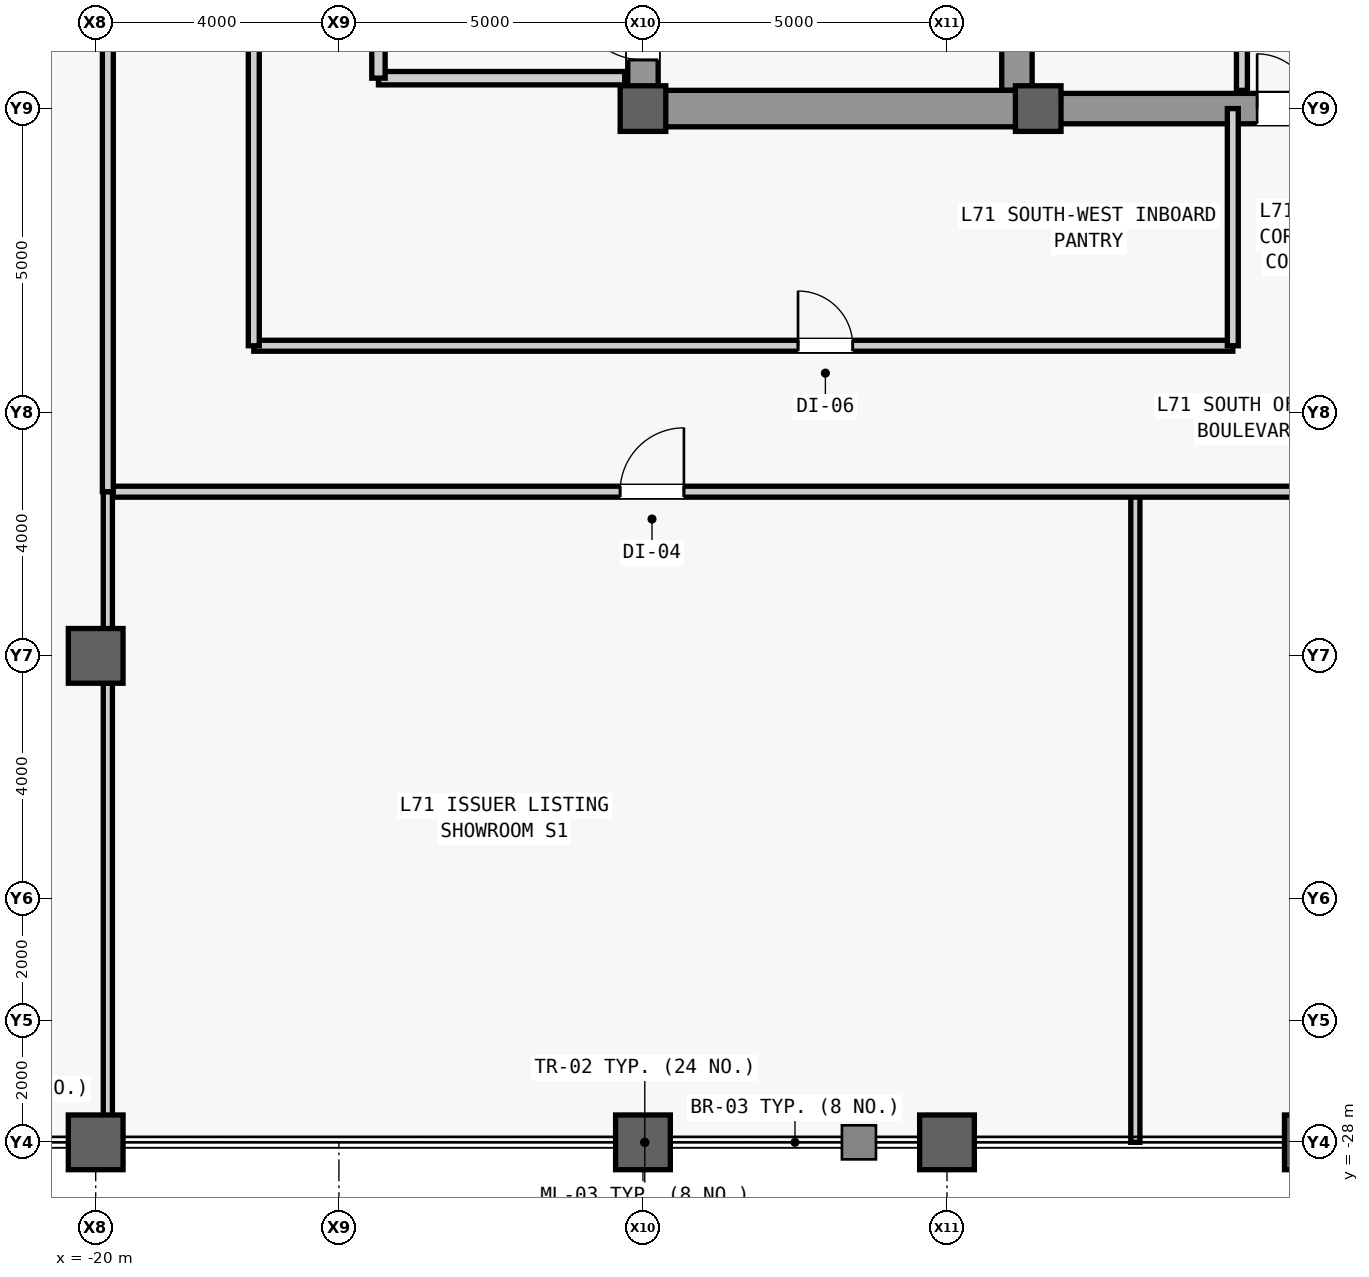
"""IFC4 building model, lengths in metres.
Left out: names, types, materials, properties, quantities, classifications, styles, units other than length and angle.
Written with IfcOpenShell. Run it as: python <this file> out.ifc"""

import sys

from ifc_helpers import new_model, si_unit, direction, frame, frame_2d, origin, origin_2d, place, context, subcontext, project, spatial, rectangle, hollow_rectangle, extrude, source, transform, mapped, element, fill, save


model = new_model("IFC4")
c1 = context("Model", 3, precision=1e-05, world=origin(), true_north=direction((0.0, 1.0)))
c2 = subcontext(c1, "Body", "Model", "MODEL_VIEW")
j1 = project(units=[si_unit("LENGTHUNIT", "METRE"), si_unit("PLANEANGLEUNIT", "RADIAN")], contexts=[c1])
p1 = place(None, origin())
s1 = spatial("IfcSite", under=j1, at=p1, CompositionType="ELEMENT")
p2 = place(p1, origin())
s2 = spatial("IfcBuilding", under=s1, at=p2, CompositionType="ELEMENT")
p3 = place(p2, frame((0.0, 0.0, 301.5)))
s3 = spatial("IfcBuildingStorey", under=s2, at=p3, CompositionType="ELEMENT", Elevation=301.5)
m1 = source(origin(), c2, "Body", "SweptSolid", [
    extrude(rectangle(XDim=22.0, YDim=0.5, at=frame_2d((11.0, 0.0))), origin(), (0.0, 0.0, 1.0), 3.78),
])
p4 = place(p3, frame((-11.0, -11.0, 0.0), z_axis=(0.0, 0.0, 1.0), x_axis=(0.0, 1.0, 0.0)))
e1 = element("IfcWall", 1, at=p4, inside=s3, PredefinedType="SHEAR", context=c2, shape_type="MappedRepresentation", body=[
    mapped(m1, transform((0.0, 0.0, 0.0), scale=1.0)),
])
m2 = source(origin(), c2, "Body", "SweptSolid", [
    extrude(rectangle(XDim=1.1, YDim=2.2, at=frame_2d((0.55, 1.1))), frame((0.0, 0.26, 0.0), z_axis=(0.0, -1.0, 0.0), x_axis=(1.0, 0.0, 0.0)), (0.0, 0.0, 1.0), 0.52),
])
p5 = place(p4, frame((0.8, 0.0, 0.0)))
e2 = element("IfcOpeningElement", 2, at=p5, cuts=e1, PredefinedType="OPENING", context=c2, shape_type="MappedRepresentation", body=[
    mapped(m2, transform((0.0, 0.0, 0.0), scale=1.0)),
])
p6 = place(p4, frame((12.5, 0.0, 0.0)))
e3 = element("IfcOpeningElement", 3, at=p6, cuts=e1, PredefinedType="OPENING", context=c2, shape_type="MappedRepresentation", body=[
    mapped(m2, transform((0.0, 0.0, 0.0), scale=1.0)),
])
m3 = source(origin(), c2, "Body", "SweptSolid", [
    extrude(rectangle(XDim=0.9, YDim=2.15, at=frame_2d((0.45, 1.075))), frame((0.0, 0.26, 0.0), z_axis=(0.0, -1.0, 0.0), x_axis=(1.0, 0.0, 0.0)), (0.0, 0.0, 1.0), 0.52),
])
p7 = place(p4, frame((6.85, 0.0, 0.0)))
e4 = element("IfcOpeningElement", 4, at=p7, cuts=e1, PredefinedType="OPENING", context=c2, shape_type="MappedRepresentation", body=[
    mapped(m3, transform((0.0, 0.0, 0.0), scale=1.0)),
])
m4 = source(origin(), c2, "Body", "SweptSolid", [
    extrude(rectangle(XDim=1.2, YDim=2.3, at=frame_2d((0.6, 1.15))), frame((0.0, 0.26, 0.0), z_axis=(0.0, -1.0, 0.0), x_axis=(1.0, 0.0, 0.0)), (0.0, 0.0, 1.0), 0.52),
])
p8 = place(p4, frame((14.6, 0.0, 0.0)))
e5 = element("IfcOpeningElement", 5, at=p8, cuts=e1, PredefinedType="OPENING", context=c2, shape_type="MappedRepresentation", body=[
    mapped(m4, transform((0.0, 0.0, 0.0), scale=1.0)),
])
p9 = place(p4, frame((18.2, 0.0, 0.0)))
e6 = element("IfcOpeningElement", 6, at=p9, cuts=e1, PredefinedType="OPENING", context=c2, shape_type="MappedRepresentation", body=[
    mapped(m4, transform((0.0, 0.0, 0.0), scale=1.0)),
])
m5 = source(origin(), c2, "Body", "SweptSolid", [
    extrude(rectangle(XDim=1.3, YDim=2.3, at=frame_2d((0.65, 1.15))), frame((0.0, 0.26, 0.0), z_axis=(0.0, -1.0, 0.0), x_axis=(1.0, 0.0, 0.0)), (0.0, 0.0, 1.0), 0.52),
])
p10 = place(p4, frame((2.7, 0.0, 0.0)))
e7 = element("IfcOpeningElement", 7, at=p10, cuts=e1, PredefinedType="OPENING", context=c2, shape_type="MappedRepresentation", body=[
    mapped(m5, transform((0.0, 0.0, 0.0), scale=1.0)),
])
m6 = source(origin(), c2, "Body", "SweptSolid", [
    extrude(rectangle(XDim=21.4, YDim=0.5, at=frame_2d((10.7, 0.0))), origin(), (0.0, 0.0, 1.0), 3.78),
])
p11 = place(p3, frame((-4.85, -10.7, 0.0), z_axis=(0.0, 0.0, 1.0), x_axis=(0.0, 1.0, 0.0)))
e8 = element("IfcWall", 8, at=p11, inside=s3, PredefinedType="SHEAR", context=c2, shape_type="MappedRepresentation", body=[
    mapped(m6, transform((0.0, 0.0, 0.0), scale=1.0)),
])
m7 = source(origin(), c2, "Body", "SweptSolid", [
    extrude(rectangle(XDim=5.9, YDim=0.6, at=frame_2d((2.95, 0.0))), origin(), (0.0, 0.0, 1.0), 3.78),
])
p12 = place(p3, frame((-10.75, -11.0, 0.0), z_axis=(0.0, 0.0, 1.0), x_axis=(1.0, 0.0, 0.0)))
e9 = element("IfcWall", 9, at=p12, inside=s3, PredefinedType="SHEAR", context=c2, shape_type="MappedRepresentation", body=[
    mapped(m7, transform((0.0, 0.0, 0.0), scale=1.0)),
])
m8 = source(origin(), c2, "Body", "SweptSolid", [
    extrude(rectangle(XDim=9.2, YDim=0.5, at=frame_2d((4.6, 0.0))), origin(), (0.0, 0.0, 1.0), 3.78),
])
p13 = place(p3, frame((-4.6, -11.0, 0.0), z_axis=(0.0, 0.0, 1.0), x_axis=(1.0, 0.0, 0.0)))
e10 = element("IfcWall", 10, at=p13, inside=s3, PredefinedType="SHEAR", context=c2, shape_type="MappedRepresentation", body=[
    mapped(m8, transform((0.0, 0.0, 0.0), scale=1.0)),
])
m9 = source(origin(), c2, "Body", "SweptSolid", [
    extrude(rectangle(XDim=1.8, YDim=2.25, at=frame_2d((0.9, 1.125))), frame((0.0, 0.26, 0.0), z_axis=(0.0, -1.0, 0.0), x_axis=(1.0, 0.0, 0.0)), (0.0, 0.0, 1.0), 0.52),
])
p14 = place(p13, frame((3.7, 0.0, 0.0)))
e11 = element("IfcOpeningElement", 11, at=p14, cuts=e10, PredefinedType="OPENING", context=c2, shape_type="MappedRepresentation", body=[
    mapped(m9, transform((0.0, 0.0, 0.0), scale=1.0)),
])
m10 = source(origin(), c2, "Body", "SweptSolid", [
    extrude(hollow_rectangle(XDim=0.9, YDim=0.9, WallThickness=0.05, at=origin_2d()), origin(), (0.0, 0.0, 1.0), 4.0),
])
for number, where, z_axis, x_axis in (
    (12, (-20.0, -28.0, 0.0), (0.0, 0.0, 1.0), (1.0, 0.0, 0.0)),
    (13, (-20.0, -20.0, 0.0), (0.0, 0.0, 1.0), (1.0, 0.0, 0.0)),
    (14, (-11.0, -28.0, 0.0), (0.0, 0.0, 1.0), (1.0, 0.0, 0.0)),
):
    element("IfcColumn", number, at=place(p3, frame(where, z_axis=z_axis, x_axis=x_axis)), inside=s3, PredefinedType="COLUMN", context=c2, shape_type="MappedRepresentation", body=[
        mapped(m10, transform((0.0, 0.0, 0.0), scale=1.0)),
    ])
m11 = source(origin(), c2, "Body", "SweptSolid", [
    extrude(rectangle(XDim=0.75, YDim=0.75, at=origin_2d()), origin(), (0.0, 0.0, 1.0), 4.0),
])
p15 = place(p3, frame((-11.0, -11.0, 0.0), z_axis=(0.0, 0.0, 1.0), x_axis=(1.0, 0.0, 0.0)))
e15 = element("IfcColumn", 15, at=p15, inside=s3, PredefinedType="COLUMN", context=c2, shape_type="MappedRepresentation", body=[
    mapped(m11, transform((0.0, 0.0, 0.0), scale=1.0)),
])
p16 = place(p3, frame((-6.0, -28.0, 0.0), z_axis=(0.0, 0.0, 1.0), x_axis=(1.0, 0.0, 0.0)))
e16 = element("IfcColumn", 16, at=p16, inside=s3, PredefinedType="COLUMN", context=c2, shape_type="MappedRepresentation", body=[
    mapped(m10, transform((0.0, 0.0, 0.0), scale=1.0)),
])
p17 = place(p3, frame((-4.5, -11.0, 0.0), z_axis=(0.0, 0.0, 1.0), x_axis=(1.0, 0.0, 0.0)))
e17 = element("IfcColumn", 17, at=p17, inside=s3, PredefinedType="COLUMN", context=c2, shape_type="MappedRepresentation", body=[
    mapped(m11, transform((0.0, 0.0, 0.0), scale=1.0)),
])
p18 = place(p3, frame((0.0, -28.0, 0.0), z_axis=(0.0, 0.0, 1.0), x_axis=(1.0, 0.0, 0.0)))
e18 = element("IfcColumn", 18, at=p18, inside=s3, PredefinedType="COLUMN", context=c2, shape_type="MappedRepresentation", body=[
    mapped(m10, transform((0.0, 0.0, 0.0), scale=1.0)),
])
m12 = source(origin(), c2, "Body", "SweptSolid", [
    extrude(rectangle(XDim=4.05, YDim=0.22, at=frame_2d((2.025, 0.0))), origin(), (0.0, 0.0, 1.0), 3.78),
])
p19 = place(p3, frame((-15.35, -10.5, 0.0), z_axis=(0.0, 0.0, 1.0), x_axis=(1.0, 0.0, 0.0)))
e19 = element("IfcWall", 19, at=p19, inside=s3, PredefinedType="PARTITIONING", context=c2, shape_type="MappedRepresentation", body=[
    mapped(m12, transform((0.0, 0.0, 0.0), scale=1.0)),
])
m13 = source(origin(), c2, "Body", "SweptSolid", [
    extrude(rectangle(XDim=4.4, YDim=0.22, at=frame_2d((2.2, 0.0))), origin(), (0.0, 0.0, 1.0), 3.78),
])
p20 = place(p3, frame((-15.35, -10.5, 0.0), z_axis=(0.0, 0.0, 1.0), x_axis=(0.0, 1.0, 0.0)))
e20 = element("IfcWall", 20, at=p20, inside=s3, PredefinedType="PARTITIONING", context=c2, shape_type="MappedRepresentation", body=[
    mapped(m13, transform((0.0, 0.0, 0.0), scale=1.0)),
])
m14 = source(origin(), c2, "Body", "SweptSolid", [
    extrude(rectangle(XDim=1.2, YDim=2.2, at=frame_2d((0.6, 1.1))), frame((0.0, 0.12, 0.0), z_axis=(0.0, -1.0, 0.0), x_axis=(1.0, 0.0, 0.0)), (0.0, 0.0, 1.0), 0.24),
])
p21 = place(p20, frame((1.6, 0.0, 0.0)))
e21 = element("IfcOpeningElement", 21, at=p21, cuts=e20, PredefinedType="OPENING", context=c2, shape_type="MappedRepresentation", body=[
    mapped(m14, transform((0.0, 0.0, 0.0), scale=1.0)),
])
m15 = source(origin(), c2, "Body", "SweptSolid", [
    extrude(rectangle(XDim=5.4, YDim=0.18, at=frame_2d((2.7, 0.0))), origin(), (0.0, 0.0, 1.0), 3.78),
])
p22 = place(p3, frame((-1.15, -10.7, 0.0), z_axis=(0.0, 0.0, 1.0), x_axis=(0.0, 1.0, 0.0)))
e22 = element("IfcWall", 22, at=p22, inside=s3, PredefinedType="PARTITIONING", context=c2, shape_type="MappedRepresentation", body=[
    mapped(m15, transform((0.0, 0.0, 0.0), scale=1.0)),
])
m16 = source(origin(), c2, "Body", "SweptSolid", [
    extrude(rectangle(XDim=0.9, YDim=2.15, at=frame_2d((0.45, 1.075))), frame((0.0, 0.1, 0.0), z_axis=(0.0, -1.0, 0.0), x_axis=(1.0, 0.0, 0.0)), (0.0, 0.0, 1.0), 0.2),
])
p23 = place(p22, frame((0.9, 0.0, 0.0)))
e23 = element("IfcOpeningElement", 23, at=p23, cuts=e22, PredefinedType="OPENING", context=c2, shape_type="MappedRepresentation", body=[
    mapped(m16, transform((0.0, 0.0, 0.0), scale=1.0)),
])
p24 = place(p22, frame((3.6, 0.0, 0.0)))
e24 = element("IfcOpeningElement", 24, at=p24, cuts=e22, PredefinedType="OPENING", context=c2, shape_type="MappedRepresentation", body=[
    mapped(m16, transform((0.0, 0.0, 0.0), scale=1.0)),
])
m17 = source(origin(), c2, "Body", "SweptSolid", [
    extrude(rectangle(XDim=16.1, YDim=0.18, at=frame_2d((8.05, 0.0))), origin(), (0.0, 0.0, 1.0), 3.78),
])
p25 = place(p3, frame((-17.4, -14.9, 0.0), z_axis=(0.0, 0.0, 1.0), x_axis=(1.0, 0.0, 0.0)))
e25 = element("IfcWall", 25, at=p25, inside=s3, PredefinedType="PARTITIONING", context=c2, shape_type="MappedRepresentation", body=[
    mapped(m17, transform((0.0, 0.0, 0.0), scale=1.0)),
])
p26 = place(p25, frame((8.95, 0.0, 0.0)))
e26 = element("IfcOpeningElement", 26, at=p26, cuts=e25, PredefinedType="OPENING", context=c2, shape_type="MappedRepresentation", body=[
    mapped(m16, transform((0.0, 0.0, 0.0), scale=1.0)),
])
m18 = source(origin(), c2, "Body", "SweptSolid", [
    extrude(rectangle(XDim=5.1, YDim=0.18, at=frame_2d((2.55, 0.0))), origin(), (0.0, 0.0, 1.0), 3.78),
])
p27 = place(p3, frame((-17.4, -14.9, 0.0), z_axis=(0.0, 0.0, 1.0), x_axis=(0.0, 1.0, 0.0)))
e27 = element("IfcWall", 27, at=p27, inside=s3, PredefinedType="PARTITIONING", context=c2, shape_type="MappedRepresentation", body=[
    mapped(m18, transform((0.0, 0.0, 0.0), scale=1.0)),
])
m19 = source(origin(), c2, "Body", "SweptSolid", [
    extrude(rectangle(XDim=3.9, YDim=0.18, at=frame_2d((1.95, 0.0))), origin(), (0.0, 0.0, 1.0), 3.78),
])
p28 = place(p3, frame((-1.3, -14.9, 0.0), z_axis=(0.0, 0.0, 1.0), x_axis=(0.0, 1.0, 0.0)))
e28 = element("IfcWall", 28, at=p28, inside=s3, PredefinedType="PARTITIONING", context=c2, shape_type="MappedRepresentation", body=[
    mapped(m19, transform((0.0, 0.0, 0.0), scale=1.0)),
])
m20 = source(origin(), c2, "Body", "SweptSolid", [
    extrude(rectangle(XDim=10.7, YDim=0.15, at=frame_2d((5.35, 0.0))), origin(), (0.0, 0.0, 1.0), 3.78),
])
p29 = place(p3, frame((-2.903, -28.0, 0.0), z_axis=(0.0, 0.0, 1.0), x_axis=(0.0, 1.0, 0.0)))
e29 = element("IfcWall", 29, at=p29, inside=s3, PredefinedType="PARTITIONING", context=c2, shape_type="MappedRepresentation", body=[
    mapped(m20, transform((0.0, 0.0, 0.0), scale=1.0)),
])
m21 = source(origin(), c2, "Body", "SweptSolid", [
    extrude(rectangle(XDim=37.55, YDim=0.18, at=frame_2d((18.775, 0.0))), origin(), (0.0, 0.0, 1.0), 3.78),
])
p30 = place(p3, frame((-19.8, -17.3, 0.0), z_axis=(0.0, 0.0, 1.0), x_axis=(1.0, 0.0, 0.0)))
e30 = element("IfcWall", 30, at=p30, inside=s3, PredefinedType="PARTITIONING", context=c2, shape_type="MappedRepresentation", body=[
    mapped(m21, transform((0.0, 0.0, 0.0), scale=1.0)),
])
m22 = source(origin(), c2, "Body", "SweptSolid", [
    extrude(rectangle(XDim=1.05, YDim=2.2, at=frame_2d((0.525, 1.1))), frame((0.0, 0.1, 0.0), z_axis=(0.0, -1.0, 0.0), x_axis=(1.0, 0.0, 0.0)), (0.0, 0.0, 1.0), 0.2),
])
p31 = place(p30, frame((8.424, 0.0, 0.0)))
e31 = element("IfcOpeningElement", 31, at=p31, cuts=e30, PredefinedType="OPENING", context=c2, shape_type="MappedRepresentation", body=[
    mapped(m22, transform((0.0, 0.0, 0.0), scale=1.0)),
])
p32 = place(p30, frame((26.174, 0.0, 0.0)))
e32 = element("IfcOpeningElement", 32, at=p32, cuts=e30, PredefinedType="OPENING", context=c2, shape_type="MappedRepresentation", body=[
    mapped(m22, transform((0.0, 0.0, 0.0), scale=1.0)),
])
m23 = source(origin(), c2, "Body", "SweptSolid", [
    extrude(rectangle(XDim=10.7, YDim=0.15, at=frame_2d((5.35, 0.0))), origin(), (0.0, 0.0, 1.0), 3.164),
])
p33 = place(p3, frame((-19.8, -28.0, 0.0), z_axis=(0.0, 0.0, 1.0), x_axis=(0.0, 1.0, 0.0)))
e33 = element("IfcWall", 33, at=p33, inside=s3, PredefinedType="PARTITIONING", context=c2, shape_type="MappedRepresentation", body=[
    mapped(m23, transform((0.0, 0.0, 0.0), scale=1.0)),
])
m24 = source(origin(), c2, "Body", "SweptSolid", [
    extrude(rectangle(XDim=39.8, YDim=0.18, at=frame_2d((19.9, 0.0))), origin(), (0.0, 0.0, 1.0), 3.164),
])
p34 = place(p3, frame((-19.8, -17.3, 0.0), z_axis=(0.0, 0.0, 1.0), x_axis=(0.0, 1.0, 0.0)))
e34 = element("IfcWall", 34, at=p34, inside=s3, PredefinedType="PARTITIONING", context=c2, shape_type="MappedRepresentation", body=[
    mapped(m24, transform((0.0, 0.0, 0.0), scale=1.0)),
])
m25 = source(origin(), c2, "Body", "SweptSolid", [
    extrude(rectangle(XDim=0.95, YDim=2.15, at=frame_2d((0.475, 1.075))), frame((0.0, 0.1, 0.0), z_axis=(0.0, -1.0, 0.0), x_axis=(1.0, 0.0, 0.0)), (0.0, 0.0, 1.0), 0.2),
])
p35 = place(p34, frame((9.545, 0.0, 0.0)))
e35 = element("IfcOpeningElement", 35, at=p35, cuts=e34, PredefinedType="OPENING", context=c2, shape_type="MappedRepresentation", body=[
    mapped(m25, transform((0.0, 0.0, 0.0), scale=1.0)),
])
p36 = place(p34, frame((24.195, 0.0, 0.0)))
e36 = element("IfcOpeningElement", 36, at=p36, cuts=e34, PredefinedType="OPENING", context=c2, shape_type="MappedRepresentation", body=[
    mapped(m25, transform((0.0, 0.0, 0.0), scale=1.0)),
])
m26 = source(origin(), c2, "Body", "SweptSolid", [
    extrude(rectangle(XDim=1.1, YDim=2.2, at=frame_2d((0.55, 1.1))), frame((0.0, 0.025, 0.0), z_axis=(0.0, -1.0, 0.0), x_axis=(1.0, 0.0, 0.0)), (0.0, 0.0, 1.0), 0.05),
])
p37 = place(p5, origin())
e37 = element("IfcDoor", 37, at=p37, inside=s3, OperationType="SINGLE_SWING_RIGHT", PredefinedType="DOOR", context=c2, shape_type="MappedRepresentation", body=[
    mapped(m26, transform((0.0, 0.0, 0.0), scale=1.0)),
])
fill(e2, e37)
m27 = source(origin(), c2, "Body", "SweptSolid", [
    extrude(rectangle(XDim=1.8, YDim=2.25, at=frame_2d((0.9, 1.125))), frame((0.0, 0.025, 0.0), z_axis=(0.0, -1.0, 0.0), x_axis=(1.0, 0.0, 0.0)), (0.0, 0.0, 1.0), 0.05),
])
p38 = place(p14, origin())
e38 = element("IfcDoor", 38, at=p38, inside=s3, OperationType="SINGLE_SWING_LEFT", PredefinedType="DOOR", context=c2, shape_type="MappedRepresentation", body=[
    mapped(m27, transform((0.0, 0.0, 0.0), scale=1.0)),
])
fill(e11, e38)
m28 = source(origin(), c2, "Body", "SweptSolid", [
    extrude(rectangle(XDim=0.9, YDim=2.15, at=frame_2d((0.45, 1.075))), frame((0.0, 0.025, 0.0), z_axis=(0.0, -1.0, 0.0), x_axis=(1.0, 0.0, 0.0)), (0.0, 0.0, 1.0), 0.05),
])
p39 = place(p26, origin())
e39 = element("IfcDoor", 39, at=p39, inside=s3, OperationType="SINGLE_SWING_LEFT", PredefinedType="DOOR", context=c2, shape_type="MappedRepresentation", body=[
    mapped(m28, transform((0.0, 0.0, 0.0), scale=1.0)),
])
fill(e26, e39)
m29 = source(origin(), c2, "Body", "SweptSolid", [
    extrude(rectangle(XDim=1.05, YDim=2.2, at=frame_2d((0.525, 1.1))), frame((0.0, 0.025, 0.0), z_axis=(0.0, -1.0, 0.0), x_axis=(1.0, 0.0, 0.0)), (0.0, 0.0, 1.0), 0.05),
])
p40 = place(p31, origin())
e40 = element("IfcDoor", 40, at=p40, inside=s3, OperationType="SINGLE_SWING_RIGHT", PredefinedType="DOOR", context=c2, shape_type="MappedRepresentation", body=[
    mapped(m29, transform((0.0, 0.0, 0.0), scale=1.0)),
])
fill(e31, e40)
save(model, sys.argv[1])
